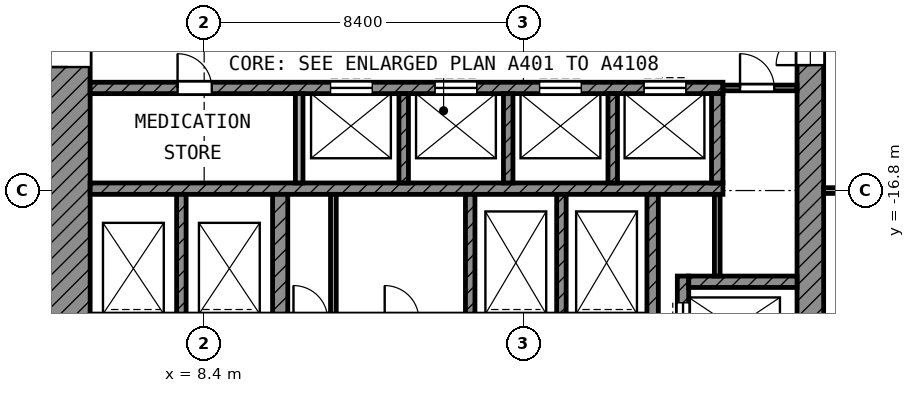
"""IFC4 building model, lengths in metres.
Left out: names, types, materials, properties, quantities, classifications, styles, units other than length and angle.
Written with IfcOpenShell. Run it as: python <this file> out.ifc"""

import sys

from ifc_helpers import new_model, si_unit, direction, frame, frame_2d, origin, place, context, subcontext, project, spatial, rectangle, extrude, element, fill, save


model = new_model("IFC4")
c1 = context("Model", 3, precision=1e-05, world=origin(), true_north=direction((0.0, 1.0)))
c2 = subcontext(c1, "Body", "Model", "MODEL_VIEW")
j1 = project(units=[si_unit("LENGTHUNIT", "METRE"), si_unit("PLANEANGLEUNIT", "RADIAN")], contexts=[c1])
p1 = place(None, origin())
s1 = spatial("IfcSite", under=j1, at=p1, CompositionType="ELEMENT")
p2 = place(p1, origin())
s2 = spatial("IfcBuilding", under=s1, at=p2, CompositionType="ELEMENT")
p3 = place(p2, frame((0.0, 0.0, 298.6)))
s3 = spatial("IfcBuildingStorey", under=s2, at=p3, CompositionType="ELEMENT", Elevation=298.6)
p4 = place(p3, frame((4.8, -24.7, 0.0), z_axis=(0.0, 0.0, 1.0), x_axis=(0.0, 1.0, 0.0)))
e1 = element("IfcWall", 1, at=p4, inside=s3, PredefinedType="SHEAR", context=c2, shape_type="SweptSolid", body=[
    extrude(rectangle(XDim=19.3, YDim=1.2, at=frame_2d((9.65, 0.0))), origin(), (0.0, 0.0, 1.0), 3.6),
])
p5 = place(p4, frame((11.15, 0.0, 0.0)))
e2 = element("IfcOpeningElement", 2, at=p5, cuts=e1, PredefinedType="OPENING", context=c2, shape_type="SweptSolid", body=[
    extrude(rectangle(XDim=1.1, YDim=2.1, at=frame_2d((0.55, 1.05))), frame((0.0, 0.61, 0.0), z_axis=(0.0, -1.0, 0.0), x_axis=(1.0, 0.0, 0.0)), (0.0, 0.0, 1.0), 1.22),
])
p6 = place(p4, frame((1.85, 0.0, 0.0)))
e3 = element("IfcOpeningElement", 3, at=p6, cuts=e1, PredefinedType="OPENING", context=c2, shape_type="SweptSolid", body=[
    extrude(rectangle(XDim=1.1, YDim=2.1, at=frame_2d((0.55, 1.05))), frame((0.0, 0.61, 0.0), z_axis=(0.0, -1.0, 0.0), x_axis=(1.0, 0.0, 0.0)), (0.0, 0.0, 1.0), 1.22),
])
p7 = place(p3, frame((24.35, -24.0, 0.0), z_axis=(0.0, 0.0, 1.0), x_axis=(0.0, 1.0, 0.0)))
e4 = element("IfcWall", 4, at=p7, inside=s3, PredefinedType="SHEAR", context=c2, shape_type="SweptSolid", body=[
    extrude(rectangle(XDim=18.6, YDim=0.7, at=frame_2d((9.3, 0.0))), origin(), (0.0, 0.0, 1.0), 3.6),
])
p8 = place(p7, frame((10.5, 0.0, 0.0)))
e5 = element("IfcOpeningElement", 5, at=p8, cuts=e4, PredefinedType="OPENING", context=c2, shape_type="SweptSolid", body=[
    extrude(rectangle(XDim=1.8, YDim=2.1, at=frame_2d((0.9, 1.05))), frame((0.0, 0.36, 0.0), z_axis=(0.0, -1.0, 0.0), x_axis=(1.0, 0.0, 0.0)), (0.0, 0.0, 1.0), 0.72),
])
p9 = place(p3, frame((5.4, -14.1, 0.0), z_axis=(0.0, 0.0, 1.0), x_axis=(1.0, 0.0, 0.0)))
e6 = element("IfcWall", 6, at=p9, inside=s3, PredefinedType="SHEAR", context=c2, shape_type="SweptSolid", body=[
    extrude(rectangle(XDim=16.65, YDim=0.3, at=frame_2d((8.325, 0.0))), origin(), (0.0, 0.0, 1.0), 3.6),
])
p10 = place(p9, frame((6.325, 0.0, 0.0)))
e7 = element("IfcOpeningElement", 7, at=p10, cuts=e6, PredefinedType="OPENING", context=c2, shape_type="SweptSolid", body=[
    extrude(rectangle(XDim=1.1, YDim=2.1, at=frame_2d((0.55, 1.05))), frame((0.0, 0.16, 0.0), z_axis=(0.0, -1.0, 0.0), x_axis=(1.0, 0.0, 0.0)), (0.0, 0.0, 1.0), 0.32),
])
p11 = place(p9, frame((9.075, 0.0, 0.0)))
e8 = element("IfcOpeningElement", 8, at=p11, cuts=e6, PredefinedType="OPENING", context=c2, shape_type="SweptSolid", body=[
    extrude(rectangle(XDim=1.1, YDim=2.1, at=frame_2d((0.55, 1.05))), frame((0.0, 0.16, 0.0), z_axis=(0.0, -1.0, 0.0), x_axis=(1.0, 0.0, 0.0)), (0.0, 0.0, 1.0), 0.32),
])
p12 = place(p9, frame((11.825, 0.0, 0.0)))
e9 = element("IfcOpeningElement", 9, at=p12, cuts=e6, PredefinedType="OPENING", context=c2, shape_type="SweptSolid", body=[
    extrude(rectangle(XDim=1.1, YDim=2.1, at=frame_2d((0.55, 1.05))), frame((0.0, 0.16, 0.0), z_axis=(0.0, -1.0, 0.0), x_axis=(1.0, 0.0, 0.0)), (0.0, 0.0, 1.0), 0.32),
])
p13 = place(p9, frame((14.575, 0.0, 0.0)))
e10 = element("IfcOpeningElement", 10, at=p13, cuts=e6, PredefinedType="OPENING", context=c2, shape_type="SweptSolid", body=[
    extrude(rectangle(XDim=1.1, YDim=2.1, at=frame_2d((0.55, 1.05))), frame((0.0, 0.16, 0.0), z_axis=(0.0, -1.0, 0.0), x_axis=(1.0, 0.0, 0.0)), (0.0, 0.0, 1.0), 0.32),
])
p14 = place(p9, frame((2.3, 0.0, 0.0)))
e11 = element("IfcOpeningElement", 11, at=p14, cuts=e6, PredefinedType="OPENING", context=c2, shape_type="SweptSolid", body=[
    extrude(rectangle(XDim=0.9, YDim=2.1, at=frame_2d((0.45, 1.05))), frame((0.0, 0.16, 0.0), z_axis=(0.0, -1.0, 0.0), x_axis=(1.0, 0.0, 0.0)), (0.0, 0.0, 1.0), 0.32),
])
p15 = place(p3, frame((5.4, -16.75, 0.0), z_axis=(0.0, 0.0, 1.0), x_axis=(1.0, 0.0, 0.0)))
e12 = element("IfcWall", 12, at=p15, inside=s3, PredefinedType="SHEAR", context=c2, shape_type="SweptSolid", body=[
    extrude(rectangle(XDim=16.65, YDim=0.3, at=frame_2d((8.325, 0.0))), origin(), (0.0, 0.0, 1.0), 3.6),
])
p16 = place(p3, frame((5.4, -20.2, 0.0), z_axis=(0.0, 0.0, 1.0), x_axis=(1.0, 0.0, 0.0)))
e13 = element("IfcWall", 13, at=p16, inside=s3, PredefinedType="SHEAR", context=c2, shape_type="SweptSolid", body=[
    extrude(rectangle(XDim=14.65, YDim=0.3, at=frame_2d((7.325, 0.0))), origin(), (0.0, 0.0, 1.0), 3.6),
])
p17 = place(p16, frame((10.55, 0.0, 0.0)))
e14 = element("IfcOpeningElement", 14, at=p17, cuts=e13, PredefinedType="OPENING", context=c2, shape_type="SweptSolid", body=[
    extrude(rectangle(XDim=1.3, YDim=2.1, at=frame_2d((0.65, 1.05))), frame((0.0, 0.16, 0.0), z_axis=(0.0, -1.0, 0.0), x_axis=(1.0, 0.0, 0.0)), (0.0, 0.0, 1.0), 0.32),
])
p18 = place(p16, frame((12.95, 0.0, 0.0)))
e15 = element("IfcOpeningElement", 15, at=p18, cuts=e13, PredefinedType="OPENING", context=c2, shape_type="SweptSolid", body=[
    extrude(rectangle(XDim=1.3, YDim=2.1, at=frame_2d((0.65, 1.05))), frame((0.0, 0.16, 0.0), z_axis=(0.0, -1.0, 0.0), x_axis=(1.0, 0.0, 0.0)), (0.0, 0.0, 1.0), 0.32),
])
p19 = place(p16, frame((0.55, 0.0, 0.0)))
e16 = element("IfcOpeningElement", 16, at=p19, cuts=e13, PredefinedType="OPENING", context=c2, shape_type="SweptSolid", body=[
    extrude(rectangle(XDim=1.3, YDim=2.1, at=frame_2d((0.65, 1.05))), frame((0.0, 0.16, 0.0), z_axis=(0.0, -1.0, 0.0), x_axis=(1.0, 0.0, 0.0)), (0.0, 0.0, 1.0), 0.32),
])
p20 = place(p16, frame((2.95, 0.0, 0.0)))
e17 = element("IfcOpeningElement", 17, at=p20, cuts=e13, PredefinedType="OPENING", context=c2, shape_type="SweptSolid", body=[
    extrude(rectangle(XDim=1.3, YDim=2.1, at=frame_2d((0.65, 1.05))), frame((0.0, 0.16, 0.0), z_axis=(0.0, -1.0, 0.0), x_axis=(1.0, 0.0, 0.0)), (0.0, 0.0, 1.0), 0.32),
])
p21 = place(p16, frame((5.35, 0.0, 0.0)))
e18 = element("IfcOpeningElement", 18, at=p21, cuts=e13, PredefinedType="OPENING", context=c2, shape_type="SweptSolid", body=[
    extrude(rectangle(XDim=0.9, YDim=2.1, at=frame_2d((0.45, 1.05))), frame((0.0, 0.16, 0.0), z_axis=(0.0, -1.0, 0.0), x_axis=(1.0, 0.0, 0.0)), (0.0, 0.0, 1.0), 0.32),
])
p22 = place(p16, frame((7.75, 0.0, 0.0)))
e19 = element("IfcOpeningElement", 19, at=p22, cuts=e13, PredefinedType="OPENING", context=c2, shape_type="SweptSolid", body=[
    extrude(rectangle(XDim=0.9, YDim=2.1, at=frame_2d((0.45, 1.05))), frame((0.0, 0.16, 0.0), z_axis=(0.0, -1.0, 0.0), x_axis=(1.0, 0.0, 0.0)), (0.0, 0.0, 1.0), 0.32),
])
p23 = place(p3, frame((10.4, -20.05, 0.0), z_axis=(0.0, 0.0, 1.0), x_axis=(0.0, 1.0, 0.0)))
e20 = element("IfcWall", 20, at=p23, inside=s3, PredefinedType="SHEAR", context=c2, shape_type="SweptSolid", body=[
    extrude(rectangle(XDim=3.15, YDim=0.4, at=frame_2d((1.575, 0.0))), origin(), (0.0, 0.0, 1.0), 3.6),
])
p24 = place(p3, frame((20.2, -20.35, 0.0), z_axis=(0.0, 0.0, 1.0), x_axis=(0.0, 1.0, 0.0)))
e21 = element("IfcWall", 21, at=p24, inside=s3, PredefinedType="SHEAR", context=c2, shape_type="SweptSolid", body=[
    extrude(rectangle(XDim=3.45, YDim=0.3, at=frame_2d((1.725, 0.0))), origin(), (0.0, 0.0, 1.0), 3.6),
])
p25 = place(p3, frame((21.9, -16.6, 0.0), z_axis=(0.0, 0.0, 1.0), x_axis=(0.0, 1.0, 0.0)))
e22 = element("IfcWall", 22, at=p25, inside=s3, PredefinedType="SHEAR", context=c2, shape_type="SweptSolid", body=[
    extrude(rectangle(XDim=2.35, YDim=0.3, at=frame_2d((1.175, 0.0))), origin(), (0.0, 0.0, 1.0), 3.6),
])
p26 = place(p3, frame((21.15, -19.2, 0.0), z_axis=(0.0, 0.0, 1.0), x_axis=(1.0, 0.0, 0.0)))
e23 = element("IfcWall", 23, at=p26, inside=s3, PredefinedType="SHEAR", context=c2, shape_type="SweptSolid", body=[
    extrude(rectangle(XDim=2.85, YDim=0.3, at=frame_2d((1.425, 0.0))), origin(), (0.0, 0.0, 1.0), 3.6),
])
p27 = place(p3, frame((21.0, -24.0, 0.0), z_axis=(0.0, 0.0, 1.0), x_axis=(0.0, 1.0, 0.0)))
e24 = element("IfcWall", 24, at=p27, inside=s3, PredefinedType="SHEAR", context=c2, shape_type="SweptSolid", body=[
    extrude(rectangle(XDim=4.95, YDim=0.3, at=frame_2d((2.475, 0.0))), origin(), (0.0, 0.0, 1.0), 3.6),
])
p28 = place(p27, frame((2.95, 0.0, 0.0)))
e25 = element("IfcOpeningElement", 25, at=p28, cuts=e24, PredefinedType="OPENING", context=c2, shape_type="SweptSolid", body=[
    extrude(rectangle(XDim=1.3, YDim=2.1, at=frame_2d((0.65, 1.05))), frame((0.0, 0.16, 0.0), z_axis=(0.0, -1.0, 0.0), x_axis=(1.0, 0.0, 0.0)), (0.0, 0.0, 1.0), 0.32),
])
p29 = place(p27, frame((0.55, 0.0, 0.0)))
e26 = element("IfcOpeningElement", 26, at=p29, cuts=e24, PredefinedType="OPENING", context=c2, shape_type="SweptSolid", body=[
    extrude(rectangle(XDim=1.3, YDim=2.1, at=frame_2d((0.65, 1.05))), frame((0.0, 0.16, 0.0), z_axis=(0.0, -1.0, 0.0), x_axis=(1.0, 0.0, 0.0)), (0.0, 0.0, 1.0), 0.32),
])
for number, where, z_axis, x_axis in (
    (27, (7.8, -20.05, 0.0), (0.0, 0.0, 1.0), (0.0, 1.0, 0.0)),
    (28, (15.4, -20.05, 0.0), (0.0, 0.0, 1.0), (0.0, 1.0, 0.0)),
    (29, (17.8, -20.05, 0.0), (0.0, 0.0, 1.0), (0.0, 1.0, 0.0)),
):
    element("IfcWall", number, at=place(p3, frame(where, z_axis=z_axis, x_axis=x_axis)), inside=s3, PredefinedType="SHEAR", context=c2, shape_type="SweptSolid", body=[
        extrude(rectangle(XDim=3.15, YDim=0.25, at=frame_2d((1.575, 0.0))), origin(), (0.0, 0.0, 1.0), 3.6),
    ])
p30 = place(p3, frame((10.9, -16.6, 0.0), z_axis=(0.0, 0.0, 1.0), x_axis=(0.0, 1.0, 0.0)))
e30 = element("IfcWall", 30, at=p30, inside=s3, PredefinedType="PARTITIONING", context=c2, shape_type="SweptSolid", body=[
    extrude(rectangle(XDim=2.35, YDim=0.2, at=frame_2d((1.175, 0.0))), origin(), (0.0, 0.0, 1.0), 3.6),
])
for number, where, z_axis, x_axis in (
    (31, (13.65, -16.6, 0.0), (0.0, 0.0, 1.0), (0.0, 1.0, 0.0)),
    (32, (16.4, -16.6, 0.0), (0.0, 0.0, 1.0), (0.0, 1.0, 0.0)),
    (33, (19.15, -16.6, 0.0), (0.0, 0.0, 1.0), (0.0, 1.0, 0.0)),
):
    element("IfcWall", number, at=place(p3, frame(where, z_axis=z_axis, x_axis=x_axis)), inside=s3, PredefinedType="SHEAR", context=c2, shape_type="SweptSolid", body=[
        extrude(rectangle(XDim=2.35, YDim=0.25, at=frame_2d((1.175, 0.0))), origin(), (0.0, 0.0, 1.0), 3.6),
    ])
p31 = place(p3, frame((21.9, -19.05, 0.0), z_axis=(0.0, 0.0, 1.0), x_axis=(0.0, 1.0, 0.0)))
e34 = element("IfcWall", 34, at=p31, inside=s3, PredefinedType="PARTITIONING", context=c2, shape_type="SweptSolid", body=[
    extrude(rectangle(XDim=2.15, YDim=0.15, at=frame_2d((1.075, 0.0))), origin(), (0.0, 0.0, 1.0), 3.6),
])
p32 = place(p3, frame((22.05, -14.1, 0.0), z_axis=(0.0, 0.0, 1.0), x_axis=(1.0, 0.0, 0.0)))
e35 = element("IfcWall", 35, at=p32, inside=s3, PredefinedType="PARTITIONING", context=c2, shape_type="SweptSolid", body=[
    extrude(rectangle(XDim=1.95, YDim=0.15, at=frame_2d((0.975, 0.0))), origin(), (0.0, 0.0, 1.0), 3.6),
])
p33 = place(p32, frame((0.45, 0.0, 0.0)))
e36 = element("IfcOpeningElement", 36, at=p33, cuts=e35, PredefinedType="OPENING", context=c2, shape_type="SweptSolid", body=[
    extrude(rectangle(XDim=0.9, YDim=2.1, at=frame_2d((0.45, 1.05))), frame((0.0, 0.085, 0.0), z_axis=(0.0, -1.0, 0.0), x_axis=(1.0, 0.0, 0.0)), (0.0, 0.0, 1.0), 0.17),
])
p34 = place(p3, frame((11.8, -20.05, 0.0), z_axis=(0.0, 0.0, 1.0), x_axis=(0.0, 1.0, 0.0)))
e37 = element("IfcWall", 37, at=p34, inside=s3, PredefinedType="PARTITIONING", context=c2, shape_type="SweptSolid", body=[
    extrude(rectangle(XDim=3.15, YDim=0.15, at=frame_2d((1.575, 0.0))), origin(), (0.0, 0.0, 1.0), 3.6),
])
p35 = place(p3, frame((24.7, -16.8, 0.0), z_axis=(0.0, 0.0, 1.0), x_axis=(1.0, 0.0, 0.0)))
e38 = element("IfcWall", 38, at=p35, inside=s3, PredefinedType="PARTITIONING", context=c2, shape_type="SweptSolid", body=[
    extrude(rectangle(XDim=34.02, YDim=0.15, at=frame_2d((17.01, 0.0))), origin(), (0.0, 0.0, 1.0), 3.6),
])
p36 = place(p35, frame((1.85, 0.0, 0.0)))
e39 = element("IfcOpeningElement", 39, at=p36, cuts=e38, PredefinedType="OPENING", context=c2, shape_type="SweptSolid", body=[
    extrude(rectangle(XDim=1.5, YDim=2.1, at=frame_2d((0.75, 1.05))), frame((0.0, 0.085, 0.0), z_axis=(0.0, -1.0, 0.0), x_axis=(1.0, 0.0, 0.0)), (0.0, 0.0, 1.0), 0.17),
])
p37 = place(p35, frame((6.2, 0.0, 0.0)))
e40 = element("IfcOpeningElement", 40, at=p37, cuts=e38, PredefinedType="OPENING", context=c2, shape_type="SweptSolid", body=[
    extrude(rectangle(XDim=1.2, YDim=2.1, at=frame_2d((0.6, 1.05))), frame((0.0, 0.085, 0.0), z_axis=(0.0, -1.0, 0.0), x_axis=(1.0, 0.0, 0.0)), (0.0, 0.0, 1.0), 0.17),
])
p38 = place(p35, frame((10.35, 0.0, 0.0)))
e41 = element("IfcOpeningElement", 41, at=p38, cuts=e38, PredefinedType="OPENING", context=c2, shape_type="SweptSolid", body=[
    extrude(rectangle(XDim=1.0, YDim=2.1, at=frame_2d((0.5, 1.05))), frame((0.0, 0.085, 0.0), z_axis=(0.0, -1.0, 0.0), x_axis=(1.0, 0.0, 0.0)), (0.0, 0.0, 1.0), 0.17),
])
p39 = place(p35, frame((20.0, 0.0, 0.0)))
e42 = element("IfcOpeningElement", 42, at=p39, cuts=e38, PredefinedType="OPENING", context=c2, shape_type="SweptSolid", body=[
    extrude(rectangle(XDim=1.2, YDim=2.1, at=frame_2d((0.6, 1.05))), frame((0.0, 0.085, 0.0), z_axis=(0.0, -1.0, 0.0), x_axis=(1.0, 0.0, 0.0)), (0.0, 0.0, 1.0), 0.17),
])
p40 = place(p35, frame((18.4, 0.0, 0.0)))
e43 = element("IfcOpeningElement", 43, at=p40, cuts=e38, PredefinedType="OPENING", context=c2, shape_type="SweptSolid", body=[
    extrude(rectangle(XDim=1.2, YDim=2.1, at=frame_2d((0.6, 1.05))), frame((0.0, 0.085, 0.0), z_axis=(0.0, -1.0, 0.0), x_axis=(1.0, 0.0, 0.0)), (0.0, 0.0, 1.0), 0.17),
])
p41 = place(p35, frame((23.1, 0.0, 0.0)))
e44 = element("IfcOpeningElement", 44, at=p41, cuts=e38, PredefinedType="OPENING", context=c2, shape_type="SweptSolid", body=[
    extrude(rectangle(XDim=1.0, YDim=2.1, at=frame_2d((0.5, 1.05))), frame((0.0, 0.085, 0.0), z_axis=(0.0, -1.0, 0.0), x_axis=(1.0, 0.0, 0.0)), (0.0, 0.0, 1.0), 0.17),
])
p42 = place(p35, frame((29.15, 0.0, 0.0)))
e45 = element("IfcOpeningElement", 45, at=p42, cuts=e38, PredefinedType="OPENING", context=c2, shape_type="SweptSolid", body=[
    extrude(rectangle(XDim=1.5, YDim=2.1, at=frame_2d((0.75, 1.05))), frame((0.0, 0.085, 0.0), z_axis=(0.0, -1.0, 0.0), x_axis=(1.0, 0.0, 0.0)), (0.0, 0.0, 1.0), 0.17),
])
p43 = place(p10, origin())
e46 = element("IfcDoor", 46, at=p43, inside=s3, OperationType="DOUBLE_DOOR_SLIDING", PredefinedType="DOOR", context=c2, shape_type="SweptSolid", body=[
    extrude(rectangle(XDim=1.1, YDim=2.1, at=frame_2d((0.55, 1.05))), frame((0.0, 0.025, 0.0), z_axis=(0.0, -1.0, 0.0), x_axis=(1.0, 0.0, 0.0)), (0.0, 0.0, 1.0), 0.05),
])
fill(e7, e46)
p44 = place(p11, origin())
e47 = element("IfcDoor", 47, at=p44, inside=s3, OperationType="DOUBLE_DOOR_SLIDING", PredefinedType="DOOR", context=c2, shape_type="SweptSolid", body=[
    extrude(rectangle(XDim=1.1, YDim=2.1, at=frame_2d((0.55, 1.05))), frame((0.0, 0.025, 0.0), z_axis=(0.0, -1.0, 0.0), x_axis=(1.0, 0.0, 0.0)), (0.0, 0.0, 1.0), 0.05),
])
fill(e8, e47)
p45 = place(p12, origin())
e48 = element("IfcDoor", 48, at=p45, inside=s3, OperationType="DOUBLE_DOOR_SLIDING", PredefinedType="DOOR", context=c2, shape_type="SweptSolid", body=[
    extrude(rectangle(XDim=1.1, YDim=2.1, at=frame_2d((0.55, 1.05))), frame((0.0, 0.025, 0.0), z_axis=(0.0, -1.0, 0.0), x_axis=(1.0, 0.0, 0.0)), (0.0, 0.0, 1.0), 0.05),
])
fill(e9, e48)
p46 = place(p13, origin())
e49 = element("IfcDoor", 49, at=p46, inside=s3, OperationType="DOUBLE_DOOR_SLIDING", PredefinedType="DOOR", context=c2, shape_type="SweptSolid", body=[
    extrude(rectangle(XDim=1.1, YDim=2.1, at=frame_2d((0.55, 1.05))), frame((0.0, 0.025, 0.0), z_axis=(0.0, -1.0, 0.0), x_axis=(1.0, 0.0, 0.0)), (0.0, 0.0, 1.0), 0.05),
])
fill(e10, e49)
p47 = place(p28, origin())
e50 = element("IfcDoor", 50, at=p47, inside=s3, OperationType="DOUBLE_DOOR_SLIDING", PredefinedType="DOOR", context=c2, shape_type="SweptSolid", body=[
    extrude(rectangle(XDim=1.3, YDim=2.1, at=frame_2d((0.65, 1.05))), frame((0.0, 0.025, 0.0), z_axis=(0.0, -1.0, 0.0), x_axis=(1.0, 0.0, 0.0)), (0.0, 0.0, 1.0), 0.05),
])
fill(e25, e50)
p48 = place(p5, origin())
e51 = element("IfcDoor", 51, at=p48, inside=s3, OperationType="SINGLE_SWING_LEFT", PredefinedType="DOOR", context=c2, shape_type="SweptSolid", body=[
    extrude(rectangle(XDim=1.1, YDim=2.1, at=frame_2d((0.55, 1.05))), frame((0.0, 0.025, 0.0), z_axis=(0.0, -1.0, 0.0), x_axis=(1.0, 0.0, 0.0)), (0.0, 0.0, 1.0), 0.05),
])
fill(e2, e51)
p49 = place(p8, origin())
e52 = element("IfcDoor", 52, at=p49, inside=s3, OperationType="DOUBLE_DOOR_SINGLE_SWING", PredefinedType="DOOR", context=c2, shape_type="SweptSolid", body=[
    extrude(rectangle(XDim=1.8, YDim=2.1, at=frame_2d((0.9, 1.05))), frame((0.0, 0.025, 0.0), z_axis=(0.0, -1.0, 0.0), x_axis=(1.0, 0.0, 0.0)), (0.0, 0.0, 1.0), 0.05),
])
fill(e5, e52)
p50 = place(p33, origin())
e53 = element("IfcDoor", 53, at=p50, inside=s3, OperationType="SINGLE_SWING_LEFT", PredefinedType="DOOR", context=c2, shape_type="SweptSolid", body=[
    extrude(rectangle(XDim=0.9, YDim=2.1, at=frame_2d((0.45, 1.05))), frame((0.0, 0.025, 0.0), z_axis=(0.0, -1.0, 0.0), x_axis=(1.0, 0.0, 0.0)), (0.0, 0.0, 1.0), 0.05),
])
fill(e36, e53)
p51 = place(p14, origin())
e54 = element("IfcDoor", 54, at=p51, inside=s3, OperationType="SINGLE_SWING_LEFT", PredefinedType="DOOR", context=c2, shape_type="SweptSolid", body=[
    extrude(rectangle(XDim=0.9, YDim=2.1, at=frame_2d((0.45, 1.05))), frame((0.0, 0.025, 0.0), z_axis=(0.0, -1.0, 0.0), x_axis=(1.0, 0.0, 0.0)), (0.0, 0.0, 1.0), 0.05),
])
fill(e11, e54)
save(model, sys.argv[1])
